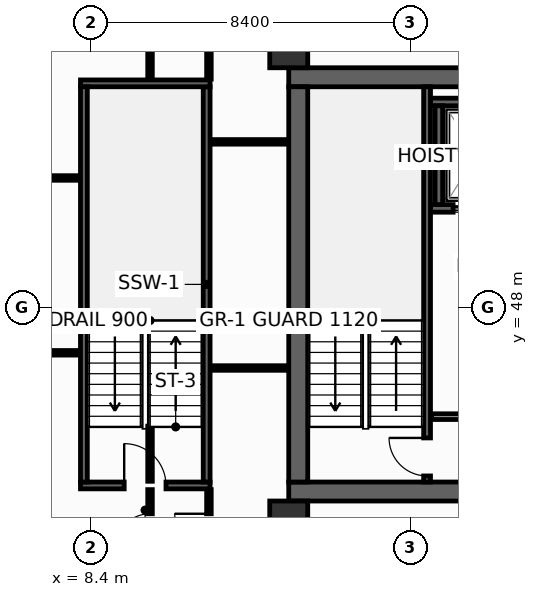
"""IFC4 building model, lengths in metres.
Left out: names, types, materials, properties, quantities, classifications, styles, units other than length and angle.
Written with IfcOpenShell. Run it as: python <this file> out.ifc"""

import sys

from ifc_helpers import new_model, si_unit, direction, frame, frame_2d, origin, origin_2d, place, context, subcontext, project, spatial, rectangle, hollow_rectangle, extrude, element, fill, save


model = new_model("IFC4")
c1 = context("Model", 3, precision=1e-05, world=origin(), true_north=direction((0.0, 1.0)))
c2 = subcontext(c1, "Body", "Model", "MODEL_VIEW")
j1 = project(units=[si_unit("LENGTHUNIT", "METRE"), si_unit("PLANEANGLEUNIT", "RADIAN")], contexts=[c1])
p1 = place(None, origin())
s1 = spatial("IfcSite", under=j1, at=p1, CompositionType="ELEMENT")
p2 = place(p1, origin())
s2 = spatial("IfcBuilding", under=s1, at=p2, CompositionType="ELEMENT")
p3 = place(p2, frame((0.0, 0.0, 179.0)))
s3 = spatial("IfcBuildingStorey", under=s2, at=p3, CompositionType="ELEMENT", Elevation=179.0)
p4 = place(p3, frame((13.6, 43.15, 0.0), z_axis=(0.0, 0.0, 1.0), x_axis=(1.0, 0.0, 0.0)))
e1 = element("IfcWall", 1, at=p4, inside=s3, PredefinedType="SHEAR", context=c2, shape_type="SweptSolid", body=[
    extrude(rectangle(XDim=32.7, YDim=0.5, at=frame_2d((16.35, 0.0))), origin(), (0.0, 0.0, 1.0), 3.55),
])
p5 = place(p4, frame((5.4, 0.0, 0.0)))
e2 = element("IfcOpeningElement", 2, at=p5, cuts=e1, PredefinedType="OPENING", context=c2, shape_type="SweptSolid", body=[
    extrude(rectangle(XDim=1.1, YDim=2.15, at=frame_2d((0.55, 1.075))), frame((0.0, 0.26, 0.0), z_axis=(0.0, -1.0, 0.0), x_axis=(1.0, 0.0, 0.0)), (0.0, 0.0, 1.0), 0.52),
])
p6 = place(p4, frame((25.6, 0.0, 0.0)))
e3 = element("IfcOpeningElement", 3, at=p6, cuts=e1, PredefinedType="OPENING", context=c2, shape_type="SweptSolid", body=[
    extrude(rectangle(XDim=1.1, YDim=2.15, at=frame_2d((0.55, 1.075))), frame((0.0, 0.26, 0.0), z_axis=(0.0, -1.0, 0.0), x_axis=(1.0, 0.0, 0.0)), (0.0, 0.0, 1.0), 0.52),
])
p7 = place(p3, frame((13.6, 54.05, 0.0), z_axis=(0.0, 0.0, 1.0), x_axis=(1.0, 0.0, 0.0)))
e4 = element("IfcWall", 4, at=p7, inside=s3, PredefinedType="SHEAR", context=c2, shape_type="SweptSolid", body=[
    extrude(rectangle(XDim=32.7, YDim=0.5, at=frame_2d((16.35, 0.0))), origin(), (0.0, 0.0, 1.0), 3.55),
])
p8 = place(p3, frame((13.85, 43.4, 0.0), z_axis=(0.0, 0.0, 1.0), x_axis=(0.0, 1.0, 0.0)))
e5 = element("IfcWall", 5, at=p8, inside=s3, PredefinedType="SHEAR", context=c2, shape_type="SweptSolid", body=[
    extrude(rectangle(XDim=10.4, YDim=0.5, at=frame_2d((5.2, 0.0))), origin(), (0.0, 0.0, 1.0), 3.55),
])
for number, where, z_axis, x_axis in (
    (6, (13.6, 54.8, 0.0), (0.0, 0.0, 1.0), (1.0, 0.0, 0.0)),
    (7, (13.6, 42.4, 0.0), (0.0, 0.0, 1.0), (1.0, 0.0, 0.0)),
):
    element("IfcColumn", number, at=place(p3, frame(where, z_axis=z_axis, x_axis=x_axis)), inside=s3, PredefinedType="COLUMN", context=c2, shape_type="SweptSolid", body=[
        extrude(hollow_rectangle(XDim=1.0, YDim=1.0, WallThickness=0.045, at=origin_2d()), origin(), (0.0, 0.0, 1.0), 3.8),
    ])
p9 = place(p3, frame((17.33, 50.6, 0.0), z_axis=(0.0, 0.0, 1.0), x_axis=(1.0, 0.0, 0.0)))
e8 = element("IfcWall", 8, at=p9, inside=s3, PredefinedType="SHEAR", context=c2, shape_type="SweptSolid", body=[
    extrude(rectangle(XDim=2.52, YDim=0.2, at=frame_2d((1.26, 0.0))), origin(), (0.0, 0.0, 1.0), 3.55),
])
p10 = place(p9, frame((0.595, 0.0, 0.0)))
e9 = element("IfcOpeningElement", 9, at=p10, cuts=e8, PredefinedType="OPENING", context=c2, shape_type="SweptSolid", body=[
    extrude(rectangle(XDim=1.25, YDim=2.3, at=frame_2d((0.625, 1.15))), frame((0.0, 0.11, 0.0), z_axis=(0.0, -1.0, 0.0), x_axis=(1.0, 0.0, 0.0)), (0.0, 0.0, 1.0), 0.22),
])
p11 = place(p3, frame((17.33, 53.4, 0.0), z_axis=(0.0, 0.0, 1.0), x_axis=(1.0, 0.0, 0.0)))
e10 = element("IfcWall", 10, at=p11, inside=s3, PredefinedType="SHEAR", context=c2, shape_type="SweptSolid", body=[
    extrude(rectangle(XDim=2.52, YDim=0.2, at=frame_2d((1.26, 0.0))), origin(), (0.0, 0.0, 1.0), 3.55),
])
p12 = place(p3, frame((17.55, 50.7, 0.0), z_axis=(0.0, 0.0, 1.0), x_axis=(0.0, 1.0, 0.0)))
e11 = element("IfcWall", 11, at=p12, inside=s3, PredefinedType="SHEAR", context=c2, shape_type="SweptSolid", body=[
    extrude(rectangle(XDim=2.6, YDim=0.2, at=frame_2d((1.3, 0.0))), origin(), (0.0, 0.0, 1.0), 3.55),
])
p13 = place(p3, frame((17.24, 43.4, 0.0), z_axis=(0.0, 0.0, 1.0), x_axis=(0.0, 1.0, 0.0)))
e12 = element("IfcWall", 12, at=p13, inside=s3, PredefinedType="SHEAR", context=c2, shape_type="SweptSolid", body=[
    extrude(rectangle(XDim=10.4, YDim=0.18, at=frame_2d((5.2, 0.0))), origin(), (0.0, 0.0, 1.0), 3.55),
])
p14 = place(p13, frame((0.16, 0.0, 0.0)))
e13 = element("IfcOpeningElement", 13, at=p14, cuts=e12, PredefinedType="OPENING", context=c2, shape_type="SweptSolid", body=[
    extrude(rectangle(XDim=1.0, YDim=2.15, at=frame_2d((0.5, 1.075))), frame((0.0, 0.1, 0.0), z_axis=(0.0, -1.0, 0.0), x_axis=(1.0, 0.0, 0.0)), (0.0, 0.0, 1.0), 0.2),
])
p15 = place(p3, frame((8.12, 43.31, 0.0), z_axis=(0.0, 0.0, 1.0), x_axis=(1.0, 0.0, 0.0)))
e14 = element("IfcWall", 14, at=p15, inside=s3, PredefinedType="SHEAR", context=c2, shape_type="SweptSolid", body=[
    extrude(rectangle(XDim=3.41, YDim=0.18, at=frame_2d((1.705, 0.0))), origin(), (0.0, 0.0, 1.0), 3.55),
])
p16 = place(p15, frame((1.15, 0.0, 0.0)))
e15 = element("IfcOpeningElement", 15, at=p16, cuts=e14, PredefinedType="OPENING", context=c2, shape_type="SweptSolid", body=[
    extrude(rectangle(XDim=1.1, YDim=2.15, at=frame_2d((0.55, 1.075))), frame((0.0, 0.1, 0.0), z_axis=(0.0, -1.0, 0.0), x_axis=(1.0, 0.0, 0.0)), (0.0, 0.0, 1.0), 0.2),
])
p17 = place(p3, frame((11.44, 43.4, 0.0), z_axis=(0.0, 0.0, 1.0), x_axis=(0.0, 1.0, 0.0)))
e16 = element("IfcWall", 16, at=p17, inside=s3, PredefinedType="SHEAR", context=c2, shape_type="SweptSolid", body=[
    extrude(rectangle(XDim=10.4, YDim=0.18, at=frame_2d((5.2, 0.0))), origin(), (0.0, 0.0, 1.0), 3.55),
])
p18 = place(p3, frame((11.53, 53.89, 0.0), z_axis=(0.0, 0.0, 1.0), x_axis=(-1.0, 0.0, 0.0)))
e17 = element("IfcWall", 17, at=p18, inside=s3, PredefinedType="SHEAR", context=c2, shape_type="SweptSolid", body=[
    extrude(rectangle(XDim=3.41, YDim=0.18, at=frame_2d((1.705, 0.0))), origin(), (0.0, 0.0, 1.0), 3.55),
])
p19 = place(p3, frame((8.21, 53.8, 0.0), z_axis=(0.0, 0.0, 1.0), x_axis=(0.0, -1.0, 0.0)))
e18 = element("IfcWall", 18, at=p19, inside=s3, PredefinedType="SHEAR", context=c2, shape_type="SweptSolid", body=[
    extrude(rectangle(XDim=10.4, YDim=0.18, at=frame_2d((5.2, 0.0))), origin(), (0.0, 0.0, 1.0), 3.55),
])
p20 = place(p3, frame((17.36, 45.12, 0.0), z_axis=(0.0, 0.0, 1.0), x_axis=(1.0, 0.0, 0.0)))
e19 = element("IfcWall", 19, at=p20, inside=s3, PredefinedType="PARTITIONING", context=c2, shape_type="SweptSolid", body=[
    extrude(rectangle(XDim=5.14, YDim=0.15, at=frame_2d((2.57, 0.0))), origin(), (0.0, 0.0, 1.0), 3.55),
])
p21 = place(p20, frame((1.8, 0.0, 0.0)))
e20 = element("IfcOpeningElement", 20, at=p21, cuts=e19, PredefinedType="OPENING", context=c2, shape_type="SweptSolid", body=[
    extrude(rectangle(XDim=1.1, YDim=2.15, at=frame_2d((0.55, 1.075))), frame((0.0, 0.085, 0.0), z_axis=(0.0, -1.0, 0.0), x_axis=(1.0, 0.0, 0.0)), (0.0, 0.0, 1.0), 0.17),
])
p22 = place(p3, frame((11.55, 52.35, 0.0), z_axis=(0.0, 0.0, 1.0), x_axis=(1.0, 0.0, 0.0)))
e21 = element("IfcWall", 21, at=p22, inside=s3, PredefinedType="PARTITIONING", context=c2, shape_type="SweptSolid", body=[
    extrude(rectangle(XDim=2.03, YDim=0.12, at=frame_2d((1.015, 0.0))), origin(), (0.0, 0.0, 1.0), 3.55),
])
p23 = place(p3, frame((11.5, 54.0, 0.0), z_axis=(0.0, 0.0, 1.0), x_axis=(0.0, 1.0, 0.0)))
e22 = element("IfcWall", 22, at=p23, inside=s3, PredefinedType="PARTITIONING", context=c2, shape_type="SweptSolid", body=[
    extrude(rectangle(XDim=1.995, YDim=0.12, at=frame_2d((0.998, 0.0))), origin(), (0.0, 0.0, 1.0), 2.935),
])
p24 = place(p3, frame((5.021, 46.8, 0.0), z_axis=(0.0, 0.0, 1.0), x_axis=(1.0, 0.0, 0.0)))
e23 = element("IfcWall", 23, at=p24, inside=s3, PredefinedType="PARTITIONING", context=c2, shape_type="SweptSolid", body=[
    extrude(rectangle(XDim=3.079, YDim=0.12, at=frame_2d((1.54, 0.0))), origin(), (0.0, 0.0, 1.0), 2.835),
])
p25 = place(p3, frame((4.242, 51.4, 0.0), z_axis=(0.0, 0.0, 1.0), x_axis=(1.0, 0.0, 0.0)))
e24 = element("IfcWall", 24, at=p25, inside=s3, PredefinedType="PARTITIONING", context=c2, shape_type="SweptSolid", body=[
    extrude(rectangle(XDim=3.858, YDim=0.12, at=frame_2d((1.929, 0.0))), origin(), (0.0, 0.0, 1.0), 2.835),
])
p26 = place(p3, frame((9.95, 41.03, 0.0), z_axis=(0.0, 0.0, 1.0), x_axis=(0.0, 1.0, 0.0)))
e25 = element("IfcWall", 25, at=p26, inside=s3, PredefinedType="PARTITIONING", context=c2, shape_type="SweptSolid", body=[
    extrude(rectangle(XDim=2.17, YDim=0.12, at=frame_2d((1.085, 0.0))), origin(), (0.0, 0.0, 1.0), 2.835),
])
p27 = place(p26, frame((0.635, 0.0, 0.0)))
e26 = element("IfcOpeningElement", 26, at=p27, cuts=e25, PredefinedType="OPENING", context=c2, shape_type="SweptSolid", body=[
    extrude(rectangle(XDim=0.9, YDim=2.1, at=frame_2d((0.45, 1.05))), frame((0.0, 0.07, 0.0), z_axis=(0.0, -1.0, 0.0), x_axis=(1.0, 0.0, 0.0)), (0.0, 0.0, 1.0), 0.14),
])
p28 = place(p3, frame((9.95, 43.42, 0.0), z_axis=(0.0, 0.0, 1.0), x_axis=(0.0, 1.0, 0.0)))
e27 = element("IfcWall", 27, at=p28, inside=s3, PredefinedType="PARTITIONING", context=c2, shape_type="SweptSolid", body=[
    extrude(rectangle(XDim=1.45, YDim=0.12, at=frame_2d((0.725, 0.0))), origin(), (0.0, 0.0, 1.0), 3.55),
])
p29 = place(p3, frame((9.95, 54.0, 0.0), z_axis=(0.0, 0.0, 1.0), x_axis=(0.0, 1.0, 0.0)))
e28 = element("IfcWall", 28, at=p29, inside=s3, PredefinedType="PARTITIONING", context=c2, shape_type="SweptSolid", body=[
    extrude(rectangle(XDim=1.995, YDim=0.12, at=frame_2d((0.998, 0.0))), origin(), (0.0, 0.0, 1.0), 2.935),
])
p30 = place(p3, frame((11.55, 46.4, 0.0), z_axis=(0.0, 0.0, 1.0), x_axis=(1.0, 0.0, 0.0)))
e29 = element("IfcWall", 29, at=p30, inside=s3, PredefinedType="PARTITIONING", context=c2, shape_type="SweptSolid", body=[
    extrude(rectangle(XDim=2.03, YDim=0.12, at=frame_2d((1.015, 0.0))), origin(), (0.0, 0.0, 1.0), 3.55),
])
p31 = place(p3, frame((11.5, 41.03, 0.0), z_axis=(0.0, 0.0, 1.0), x_axis=(0.0, 1.0, 0.0)))
e30 = element("IfcWall", 30, at=p31, inside=s3, PredefinedType="PARTITIONING", context=c2, shape_type="SweptSolid", body=[
    extrude(rectangle(XDim=2.17, YDim=0.12, at=frame_2d((1.085, 0.0))), origin(), (0.0, 0.0, 1.0), 2.835),
])
p32 = place(p31, frame((0.635, 0.0, 0.0)))
e31 = element("IfcOpeningElement", 31, at=p32, cuts=e30, PredefinedType="OPENING", context=c2, shape_type="SweptSolid", body=[
    extrude(rectangle(XDim=0.9, YDim=2.1, at=frame_2d((0.45, 1.05))), frame((0.0, 0.07, 0.0), z_axis=(0.0, -1.0, 0.0), x_axis=(1.0, 0.0, 0.0)), (0.0, 0.0, 1.0), 0.14),
])
p33 = place(p3, frame((13.8, 41.03, 0.0), z_axis=(0.0, 0.0, 1.0), x_axis=(0.0, 1.0, 0.0)))
e32 = element("IfcWall", 32, at=p33, inside=s3, PredefinedType="PARTITIONING", context=c2, shape_type="SweptSolid", body=[
    extrude(rectangle(XDim=1.85, YDim=0.15, at=frame_2d((0.925, 0.0))), origin(), (0.0, 0.0, 1.0), 3.55),
])
p34 = place(p10, origin())
e33 = element("IfcDoor", 33, at=p34, inside=s3, OperationType="SLIDING_TO_LEFT", PredefinedType="DOOR", context=c2, shape_type="SweptSolid", body=[
    extrude(rectangle(XDim=1.25, YDim=2.3, at=frame_2d((0.625, 1.15))), frame((0.0, 0.025, 0.0), z_axis=(0.0, -1.0, 0.0), x_axis=(1.0, 0.0, 0.0)), (0.0, 0.0, 1.0), 0.05),
])
fill(e9, e33)
p35 = place(p14, origin())
e34 = element("IfcDoor", 34, at=p35, inside=s3, OperationType="SINGLE_SWING_RIGHT", PredefinedType="DOOR", context=c2, shape_type="SweptSolid", body=[
    extrude(rectangle(XDim=1.0, YDim=2.15, at=frame_2d((0.5, 1.075))), frame((0.0, 0.025, 0.0), z_axis=(0.0, -1.0, 0.0), x_axis=(1.0, 0.0, 0.0)), (0.0, 0.0, 1.0), 0.05),
])
fill(e13, e34)
p36 = place(p16, origin())
e35 = element("IfcDoor", 35, at=p36, inside=s3, OperationType="SINGLE_SWING_LEFT", PredefinedType="DOOR", context=c2, shape_type="SweptSolid", body=[
    extrude(rectangle(XDim=1.1, YDim=2.15, at=frame_2d((0.55, 1.075))), frame((0.0, 0.025, 0.0), z_axis=(0.0, -1.0, 0.0), x_axis=(1.0, 0.0, 0.0)), (0.0, 0.0, 1.0), 0.05),
])
fill(e15, e35)
p37 = place(p27, origin())
e36 = element("IfcDoor", 36, at=p37, inside=s3, OperationType="SINGLE_SWING_LEFT", PredefinedType="DOOR", context=c2, shape_type="SweptSolid", body=[
    extrude(rectangle(XDim=0.9, YDim=2.1, at=frame_2d((0.45, 1.05))), frame((0.0, 0.025, 0.0), z_axis=(0.0, -1.0, 0.0), x_axis=(1.0, 0.0, 0.0)), (0.0, 0.0, 1.0), 0.05),
])
fill(e26, e36)
p38 = place(p32, origin())
e37 = element("IfcDoor", 37, at=p38, inside=s3, OperationType="SINGLE_SWING_RIGHT", PredefinedType="DOOR", context=c2, shape_type="SweptSolid", body=[
    extrude(rectangle(XDim=0.9, YDim=2.1, at=frame_2d((0.45, 1.05))), frame((0.0, 0.025, 0.0), z_axis=(0.0, -1.0, 0.0), x_axis=(1.0, 0.0, 0.0)), (0.0, 0.0, 1.0), 0.05),
])
fill(e31, e37)
save(model, sys.argv[1])
